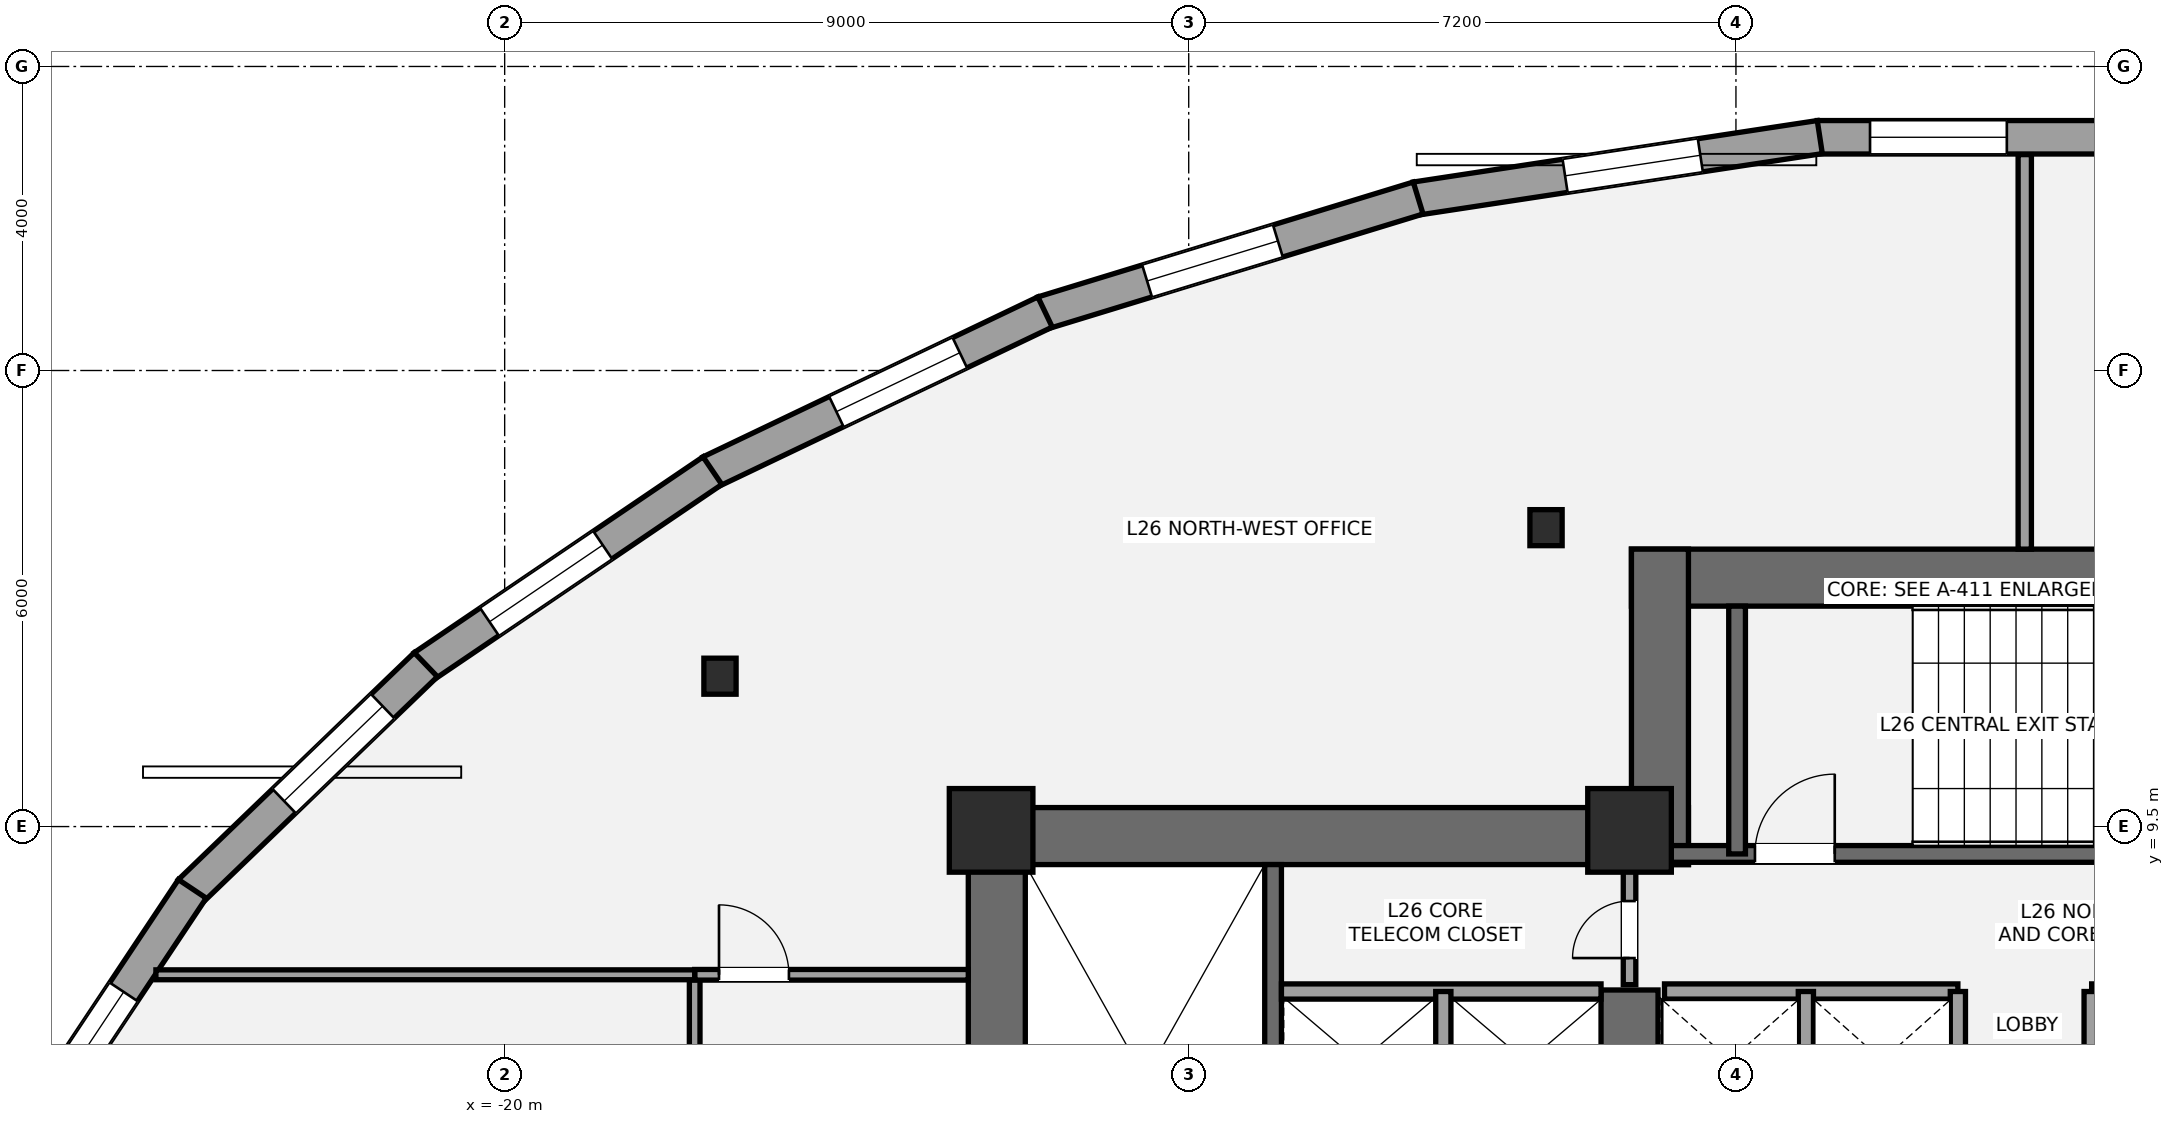
"""IFC4 building model, lengths in metres.
Left out: names, types, materials, properties, quantities, classifications, styles, units other than length and angle.
Written with IfcOpenShell. Run it as: python <this file> out.ifc"""

import sys

from ifc_helpers import new_model, si_unit, direction, frame, frame_2d, origin, origin_2d, place, context, subcontext, project, spatial, rectangle, i_section, extrude, element, fill, save


model = new_model("IFC4")
c1 = context("Model", 3, precision=1e-05, world=origin(), true_north=direction((0.0, 1.0)))
c2 = subcontext(c1, "Body", "Model", "MODEL_VIEW")
j1 = project(units=[si_unit("LENGTHUNIT", "METRE"), si_unit("PLANEANGLEUNIT", "RADIAN")], contexts=[c1])
p1 = place(None, origin())
s1 = spatial("IfcSite", under=j1, at=p1, CompositionType="ELEMENT")
p2 = place(p1, origin())
s2 = spatial("IfcBuilding", under=s1, at=p2, CompositionType="ELEMENT")
p3 = place(p2, frame((0.0, 0.0, 100.1)))
s3 = spatial("IfcBuildingStorey", under=s2, at=p3, CompositionType="ELEMENT", Elevation=100.1)
p4 = place(p3, frame((-13.525, 1.1, 0.0), z_axis=(0.0, 0.0, 1.0), x_axis=(0.0, 1.0, 0.0)))
e1 = element("IfcWall", 1, at=p4, inside=s3, PredefinedType="SHEAR", context=c2, shape_type="SweptSolid", body=[
    extrude(rectangle(XDim=8.65, YDim=0.75, at=frame_2d((4.325, 0.0))), origin(), (0.0, 0.0, 1.0), 3.5),
])
p5 = place(p3, frame((-13.9, 9.375, 0.0), z_axis=(0.0, 0.0, 1.0), x_axis=(1.0, 0.0, 0.0)))
e2 = element("IfcWall", 2, at=p5, inside=s3, PredefinedType="SHEAR", context=c2, shape_type="SweptSolid", body=[
    extrude(rectangle(XDim=9.475, YDim=0.75, at=frame_2d((4.737, 0.0))), origin(), (0.0, 0.0, 1.0), 3.5),
])
p6 = place(p3, frame((-5.2, 5.35, 0.0), z_axis=(0.0, 0.0, 1.0), x_axis=(0.0, 1.0, 0.0)))
e3 = element("IfcWall", 3, at=p6, inside=s3, PredefinedType="SHEAR", context=c2, shape_type="SweptSolid", body=[
    extrude(rectangle(XDim=2.0, YDim=0.75, at=frame_2d((1.0, 0.0))), origin(), (0.0, 0.0, 1.0), 3.5),
])
p7 = place(p3, frame((-9.89, 1.85, 0.0), z_axis=(0.0, 0.0, 1.0), x_axis=(0.0, 1.0, 0.0)))
e4 = element("IfcWall", 4, at=p7, inside=s3, PredefinedType="SHEAR", context=c2, shape_type="SweptSolid", body=[
    extrude(rectangle(XDim=7.15, YDim=0.22, at=frame_2d((3.575, 0.0))), origin(), (0.0, 0.0, 1.0), 3.5),
])
p8 = place(p3, frame((-5.175, 12.775, 0.0), z_axis=(0.0, 0.0, 1.0), x_axis=(1.0, 0.0, 0.0)))
e5 = element("IfcWall", 5, at=p8, inside=s3, PredefinedType="SHEAR", context=c2, shape_type="SweptSolid", body=[
    extrude(rectangle(XDim=10.35, YDim=0.75, at=frame_2d((5.175, 0.0))), origin(), (0.0, 0.0, 1.0), 3.5),
])
p9 = place(p3, frame((-4.8, 9.0, 0.0), z_axis=(0.0, 0.0, 1.0), x_axis=(0.0, 1.0, 0.0)))
e6 = element("IfcWall", 6, at=p9, inside=s3, PredefinedType="SHEAR", context=c2, shape_type="SweptSolid", body=[
    extrude(rectangle(XDim=4.15, YDim=0.75, at=frame_2d((2.075, 0.0))), origin(), (0.0, 0.0, 1.0), 3.5),
])
p10 = place(p3, frame((-4.7, 9.14, 0.0), z_axis=(0.0, 0.0, 1.0), x_axis=(1.0, 0.0, 0.0)))
e7 = element("IfcWall", 7, at=p10, inside=s3, PredefinedType="SHEAR", context=c2, shape_type="SweptSolid", body=[
    extrude(rectangle(XDim=9.3, YDim=0.22, at=frame_2d((4.65, 0.0))), origin(), (0.0, 0.0, 1.0), 3.5),
])
p11 = place(p10, frame((1.15, 0.0, 0.0)))
e8 = element("IfcOpeningElement", 8, at=p11, cuts=e7, PredefinedType="OPENING", context=c2, shape_type="SweptSolid", body=[
    extrude(rectangle(XDim=1.05, YDim=2.15, at=frame_2d((0.525, 1.075))), frame((0.0, 0.12, 0.0), z_axis=(0.0, -1.0, 0.0), x_axis=(1.0, 0.0, 0.0)), (0.0, 0.0, 1.0), 0.24),
])
p12 = place(p3, frame((-3.785, 9.14, 0.0), z_axis=(0.0, 0.0, 1.0), x_axis=(0.0, 1.0, 0.0)))
e9 = element("IfcWall", 9, at=p12, inside=s3, PredefinedType="SHEAR", context=c2, shape_type="SweptSolid", body=[
    extrude(rectangle(XDim=3.26, YDim=0.22, at=frame_2d((1.63, 0.0))), origin(), (0.0, 0.0, 1.0), 3.5),
])
for number, where, z_axis, x_axis in (
    (10, (-13.6, 9.45, 0.0), (0.0, 0.0, 1.0), (1.0, 0.0, 0.0)),
    (11, (-5.2, 9.45, 0.0), (0.0, 0.0, 1.0), (1.0, 0.0, 0.0)),
):
    element("IfcColumn", number, at=place(p3, frame(where, z_axis=z_axis, x_axis=x_axis)), inside=s3, PredefinedType="COLUMN", context=c2, shape_type="SweptSolid", body=[
        extrude(rectangle(XDim=1.1, YDim=1.1, at=origin_2d()), origin(), (0.0, 0.0, 1.0), 3.5),
    ])
for number, where, z_axis, x_axis in (
    (12, (-6.299, 13.433, 0.0), (0.0, 0.0, 1.0), (1.0, 0.0, 0.0)),
    (13, (-17.167, 11.478, 0.0), (0.0, 0.0, 1.0), (1.0, 0.0, 0.0)),
):
    element("IfcColumn", number, at=place(p3, frame(where, z_axis=z_axis, x_axis=x_axis)), inside=s3, PredefinedType="COLUMN", context=c2, shape_type="SweptSolid", body=[
        extrude(i_section(OverallWidth=0.424, OverallDepth=0.474, WebThickness=0.048, FlangeThickness=0.077, at=origin_2d()), origin(), (0.0, 0.0, 1.0), 3.5),
    ])
p13 = place(p3, frame((-2.73, 18.568, 0.0), z_axis=(0.0, 0.0, 1.0), x_axis=(1.0, 0.0, 0.0)))
e14 = element("IfcWall", 14, at=p13, inside=s3, PredefinedType="STANDARD", context=c2, shape_type="SweptSolid", body=[
    extrude(rectangle(XDim=5.459, YDim=0.44, at=frame_2d((2.73, 0.0))), origin(), (0.0, 0.0, 1.0), 2.528),
])
p14 = place(p13, frame((0.694, 0.0, 0.65)))
e15 = element("IfcOpeningElement", 15, at=p14, cuts=e14, PredefinedType="OPENING", context=c2, shape_type="SweptSolid", body=[
    extrude(rectangle(XDim=1.8, YDim=1.7, at=frame_2d((0.9, 0.85))), frame((0.0, 0.23, 0.0), z_axis=(0.0, -1.0, 0.0), x_axis=(1.0, 0.0, 0.0)), (0.0, 0.0, 1.0), 0.46),
])
p15 = place(p3, frame((-8.012, 17.762, 0.0), z_axis=(0.0, 0.0, 1.0), x_axis=(0.988627497469, 0.150385076545, 0.0)))
e16 = element("IfcWall", 16, at=p15, inside=s3, PredefinedType="STANDARD", context=c2, shape_type="SweptSolid", body=[
    extrude(rectangle(XDim=5.377, YDim=0.44, at=frame_2d((2.688, 0.0))), origin(), (0.0, 0.0, 1.0), 2.528),
])
p16 = place(p15, frame((1.987, 0.0, 0.65)))
e17 = element("IfcOpeningElement", 17, at=p16, cuts=e16, PredefinedType="OPENING", context=c2, shape_type="SweptSolid", body=[
    extrude(rectangle(XDim=1.8, YDim=1.7, at=frame_2d((0.9, 0.85))), frame((0.0, 0.23, 0.0), z_axis=(0.0, -1.0, 0.0), x_axis=(1.0, 0.0, 0.0)), (0.0, 0.0, 1.0), 0.46),
])
p17 = place(p3, frame((-12.92, 16.258, 0.0), z_axis=(0.0, 0.0, 1.0), x_axis=(0.956228569431, 0.292620783617, 0.0)))
e18 = element("IfcWall", 18, at=p17, inside=s3, PredefinedType="STANDARD", context=c2, shape_type="SweptSolid", body=[
    extrude(rectangle(XDim=5.165, YDim=0.44, at=frame_2d((2.583, 0.0))), origin(), (0.0, 0.0, 1.0), 2.528),
])
p18 = place(p17, frame((1.436, 0.0, 0.65)))
e19 = element("IfcOpeningElement", 19, at=p18, cuts=e18, PredefinedType="OPENING", context=c2, shape_type="SweptSolid", body=[
    extrude(rectangle(XDim=1.8, YDim=1.7, at=frame_2d((0.9, 0.85))), frame((0.0, 0.23, 0.0), z_axis=(0.0, -1.0, 0.0), x_axis=(1.0, 0.0, 0.0)), (0.0, 0.0, 1.0), 0.46),
])
p19 = place(p3, frame((-17.295, 14.166, 0.0), z_axis=(0.0, 0.0, 1.0), x_axis=(0.902372757907, 0.430956385018, 0.0)))
e20 = element("IfcWall", 20, at=p19, inside=s3, PredefinedType="STANDARD", context=c2, shape_type="SweptSolid", body=[
    extrude(rectangle(XDim=4.882, YDim=0.44, at=frame_2d((2.441, 0.0))), origin(), (0.0, 0.0, 1.0), 2.528),
])
p20 = place(p19, frame((1.839, 0.0, 0.65)))
e21 = element("IfcOpeningElement", 21, at=p20, cuts=e20, PredefinedType="OPENING", context=c2, shape_type="SweptSolid", body=[
    extrude(rectangle(XDim=1.8, YDim=1.7, at=frame_2d((0.9, 0.85))), frame((0.0, 0.23, 0.0), z_axis=(0.0, -1.0, 0.0), x_axis=(1.0, 0.0, 0.0)), (0.0, 0.0, 1.0), 0.46),
])
p21 = place(p3, frame((-21.066, 11.606, 0.0), z_axis=(0.0, 0.0, 1.0), x_axis=(0.827754551165, 0.56109036975, 0.0)))
e22 = element("IfcWall", 22, at=p21, inside=s3, PredefinedType="STANDARD", context=c2, shape_type="SweptSolid", body=[
    extrude(rectangle(XDim=4.591, YDim=0.44, at=frame_2d((2.295, 0.0))), origin(), (0.0, 0.0, 1.0), 2.528),
])
p22 = place(p21, frame((1.047, 0.0, 0.65)))
e23 = element("IfcOpeningElement", 23, at=p22, cuts=e22, PredefinedType="OPENING", context=c2, shape_type="SweptSolid", body=[
    extrude(rectangle(XDim=1.8, YDim=1.7, at=frame_2d((0.9, 0.85))), frame((0.0, 0.23, 0.0), z_axis=(0.0, -1.0, 0.0), x_axis=(1.0, 0.0, 0.0)), (0.0, 0.0, 1.0), 0.46),
])
p23 = place(p3, frame((-24.14, 8.644, 0.0), z_axis=(0.0, 0.0, 1.0), x_axis=(0.720581378362, 0.693370375166, 0.0)))
e24 = element("IfcWall", 24, at=p23, inside=s3, PredefinedType="STANDARD", context=c2, shape_type="SweptSolid", body=[
    extrude(rectangle(XDim=4.307, YDim=0.44, at=frame_2d((2.153, 0.0))), origin(), (0.0, 0.0, 1.0), 2.528),
])
p24 = place(p23, frame((1.719, 0.0, 0.65)))
e25 = element("IfcOpeningElement", 25, at=p24, cuts=e24, PredefinedType="OPENING", context=c2, shape_type="SweptSolid", body=[
    extrude(rectangle(XDim=1.8, YDim=1.7, at=frame_2d((0.9, 0.85))), frame((0.0, 0.23, 0.0), z_axis=(0.0, -1.0, 0.0), x_axis=(1.0, 0.0, 0.0)), (0.0, 0.0, 1.0), 0.46),
])
p25 = place(p3, frame((-26.34, 5.332, 0.0), z_axis=(0.0, 0.0, 1.0), x_axis=(0.554293965046, 0.83232097193, 0.0)))
e26 = element("IfcWall", 26, at=p25, inside=s3, PredefinedType="STANDARD", context=c2, shape_type="SweptSolid", body=[
    extrude(rectangle(XDim=4.023, YDim=0.44, at=frame_2d((2.011, 0.0))), origin(), (0.0, 0.0, 1.0), 2.528),
])
p26 = place(p25, frame((0.594, 0.0, 0.65)))
e27 = element("IfcOpeningElement", 27, at=p26, cuts=e26, PredefinedType="OPENING", context=c2, shape_type="SweptSolid", body=[
    extrude(rectangle(XDim=1.8, YDim=1.7, at=frame_2d((0.9, 0.85))), frame((0.0, 0.23, 0.0), z_axis=(0.0, -1.0, 0.0), x_axis=(1.0, 0.0, 0.0)), (0.0, 0.0, 1.0), 0.46),
])
p27 = place(p3, frame((-9.78, 7.33, 0.0), z_axis=(0.0, 0.0, 1.0), x_axis=(1.0, 0.0, 0.0)))
e28 = element("IfcWall", 28, at=p27, inside=s3, PredefinedType="SOLIDWALL", context=c2, shape_type="SweptSolid", body=[
    extrude(rectangle(XDim=4.205, YDim=0.2, at=frame_2d((2.103, 0.0))), origin(), (0.0, 0.0, 1.0), 3.31),
])
p28 = place(p3, frame((-7.65, 5.47, 0.0), z_axis=(0.0, 0.0, 1.0), x_axis=(0.0, 1.0, 0.0)))
e29 = element("IfcWall", 29, at=p28, inside=s3, PredefinedType="SOLIDWALL", context=c2, shape_type="SweptSolid", body=[
    extrude(rectangle(XDim=1.86, YDim=0.2, at=frame_2d((0.93, 0.0))), origin(), (0.0, 0.0, 1.0), 3.31),
])
for number, where, z_axis, x_axis in (
    (30, (-4.74, 7.33, 0.0), (0.0, 0.0, 1.0), (1.0, 0.0, 0.0)),
    (31, (0.88, 7.33, 0.0), (0.0, 0.0, 1.0), (1.0, 0.0, 0.0)),
):
    element("IfcWall", number, at=place(p3, frame(where, z_axis=z_axis, x_axis=x_axis)), inside=s3, PredefinedType="SOLIDWALL", context=c2, shape_type="SweptSolid", body=[
        extrude(rectangle(XDim=3.86, YDim=0.2, at=frame_2d((1.93, 0.0))), origin(), (0.0, 0.0, 1.0), 3.31),
    ])
for number, where, z_axis, x_axis in (
    (32, (-2.88, 5.52, 0.0), (0.0, 0.0, 1.0), (0.0, 1.0, 0.0)),
    (33, (-0.88, 5.52, 0.0), (0.0, 0.0, 1.0), (0.0, 1.0, 0.0)),
    (34, (0.88, 5.52, 0.0), (0.0, 0.0, 1.0), (0.0, 1.0, 0.0)),
):
    element("IfcWall", number, at=place(p3, frame(where, z_axis=z_axis, x_axis=x_axis)), inside=s3, PredefinedType="SOLIDWALL", context=c2, shape_type="SweptSolid", body=[
        extrude(rectangle(XDim=1.81, YDim=0.2, at=frame_2d((0.905, 0.0))), origin(), (0.0, 0.0, 1.0), 3.31),
    ])
p29 = place(p3, frame((-5.2, 7.42, 0.0), z_axis=(0.0, 0.0, 1.0), x_axis=(0.0, 1.0, 0.0)))
e35 = element("IfcWall", 35, at=p29, inside=s3, PredefinedType="PARTITIONING", context=c2, shape_type="SweptSolid", body=[
    extrude(rectangle(XDim=1.58, YDim=0.165, at=frame_2d((0.79, 0.0))), origin(), (0.0, 0.0, 1.0), 3.31),
])
p30 = place(p29, frame((0.35, 0.0, 0.0)))
e36 = element("IfcOpeningElement", 36, at=p30, cuts=e35, PredefinedType="OPENING", context=c2, shape_type="SweptSolid", body=[
    extrude(rectangle(XDim=0.75, YDim=2.1, at=frame_2d((0.375, 1.05))), frame((0.0, 0.093, 0.0), z_axis=(0.0, -1.0, 0.0), x_axis=(1.0, 0.0, 0.0)), (0.0, 0.0, 1.0), 0.185),
])
p31 = place(p3, frame((-17.5, -13.748, 0.0), z_axis=(0.0, 0.0, 1.0), x_axis=(0.0, 1.0, 0.0)))
e37 = element("IfcWall", 37, at=p31, inside=s3, PredefinedType="PARTITIONING", context=c2, shape_type="SweptSolid", body=[
    extrude(rectangle(XDim=21.298, YDim=0.14, at=frame_2d((10.649, 0.0))), origin(), (0.0, 0.0, 1.0), 2.688),
])
p32 = place(p31, frame((10.499, 0.0, 0.0)))
e38 = element("IfcOpeningElement", 38, at=p32, cuts=e37, PredefinedType="OPENING", context=c2, shape_type="SweptSolid", body=[
    extrude(rectangle(XDim=0.9, YDim=2.1, at=frame_2d((0.45, 1.05))), frame((0.0, 0.08, 0.0), z_axis=(0.0, -1.0, 0.0), x_axis=(1.0, 0.0, 0.0)), (0.0, 0.0, 1.0), 0.16),
])
p33 = place(p31, frame((17.974, 0.0, 0.0)))
e39 = element("IfcOpeningElement", 39, at=p33, cuts=e37, PredefinedType="OPENING", context=c2, shape_type="SweptSolid", body=[
    extrude(rectangle(XDim=0.9, YDim=2.1, at=frame_2d((0.45, 1.05))), frame((0.0, 0.08, 0.0), z_axis=(0.0, -1.0, 0.0), x_axis=(1.0, 0.0, 0.0)), (0.0, 0.0, 1.0), 0.16),
])
p34 = place(p3, frame((-17.5, 7.55, 0.0), z_axis=(0.0, 0.0, 1.0), x_axis=(1.0, 0.0, 0.0)))
e40 = element("IfcWall", 40, at=p34, inside=s3, PredefinedType="PARTITIONING", context=c2, shape_type="SweptSolid", body=[
    extrude(rectangle(XDim=3.6, YDim=0.14, at=frame_2d((1.8, 0.0))), origin(), (0.0, 0.0, 1.0), 3.31),
])
p35 = place(p34, frame((0.32, 0.0, 0.0)))
e41 = element("IfcOpeningElement", 41, at=p35, cuts=e40, PredefinedType="OPENING", context=c2, shape_type="SweptSolid", body=[
    extrude(rectangle(XDim=0.92, YDim=2.15, at=frame_2d((0.46, 1.075))), frame((0.0, 0.08, 0.0), z_axis=(0.0, -1.0, 0.0), x_axis=(1.0, 0.0, 0.0)), (0.0, 0.0, 1.0), 0.16),
])
p36 = place(p3, frame((0.0, 13.15, 0.0), z_axis=(0.0, 0.0, 1.0), x_axis=(0.0, 1.0, 0.0)))
e42 = element("IfcWall", 42, at=p36, inside=s3, PredefinedType="PARTITIONING", context=c2, shape_type="SweptSolid", body=[
    extrude(rectangle(XDim=5.19, YDim=0.175, at=frame_2d((2.595, 0.0))), origin(), (0.0, 0.0, 1.0), 3.31),
])
p37 = place(p3, frame((-24.589, 7.55, 0.0), z_axis=(0.0, 0.0, 1.0), x_axis=(1.0, 0.0, 0.0)))
e43 = element("IfcWall", 43, at=p37, inside=s3, PredefinedType="PARTITIONING", context=c2, shape_type="SweptSolid", body=[
    extrude(rectangle(XDim=7.089, YDim=0.13, at=frame_2d((3.544, 0.0))), origin(), (0.0, 0.0, 1.0), 2.763),
])
p38 = place(p14, origin())
e44 = element("IfcWindow", 44, at=p38, inside=s3, PartitioningType="SINGLE_PANEL", PredefinedType="WINDOW", context=c2, shape_type="SweptSolid", body=[
    extrude(rectangle(XDim=1.8, YDim=1.7, at=frame_2d((0.9, 0.85))), frame((0.0, -0.01, 0.0), z_axis=(0.0, -1.0, 0.0), x_axis=(1.0, 0.0, 0.0)), (0.0, 0.0, 1.0), 0.06),
])
fill(e15, e44)
p39 = place(p16, origin())
e45 = element("IfcWindow", 45, at=p39, inside=s3, PartitioningType="SINGLE_PANEL", PredefinedType="WINDOW", context=c2, shape_type="SweptSolid", body=[
    extrude(rectangle(XDim=1.8, YDim=1.7, at=frame_2d((0.9, 0.85))), frame((0.0, -0.01, 0.0), z_axis=(0.0, -1.0, 0.0), x_axis=(1.0, 0.0, 0.0)), (0.0, 0.0, 1.0), 0.06),
])
fill(e17, e45)
p40 = place(p18, origin())
e46 = element("IfcWindow", 46, at=p40, inside=s3, PartitioningType="SINGLE_PANEL", PredefinedType="WINDOW", context=c2, shape_type="SweptSolid", body=[
    extrude(rectangle(XDim=1.8, YDim=1.7, at=frame_2d((0.9, 0.85))), frame((0.0, -0.01, 0.0), z_axis=(0.0, -1.0, 0.0), x_axis=(1.0, 0.0, 0.0)), (0.0, 0.0, 1.0), 0.06),
])
fill(e19, e46)
p41 = place(p20, origin())
e47 = element("IfcWindow", 47, at=p41, inside=s3, PartitioningType="SINGLE_PANEL", PredefinedType="WINDOW", context=c2, shape_type="SweptSolid", body=[
    extrude(rectangle(XDim=1.8, YDim=1.7, at=frame_2d((0.9, 0.85))), frame((0.0, -0.01, 0.0), z_axis=(0.0, -1.0, 0.0), x_axis=(1.0, 0.0, 0.0)), (0.0, 0.0, 1.0), 0.06),
])
fill(e21, e47)
p42 = place(p22, origin())
e48 = element("IfcWindow", 48, at=p42, inside=s3, PartitioningType="SINGLE_PANEL", PredefinedType="WINDOW", context=c2, shape_type="SweptSolid", body=[
    extrude(rectangle(XDim=1.8, YDim=1.7, at=frame_2d((0.9, 0.85))), frame((0.0, -0.01, 0.0), z_axis=(0.0, -1.0, 0.0), x_axis=(1.0, 0.0, 0.0)), (0.0, 0.0, 1.0), 0.06),
])
fill(e23, e48)
p43 = place(p24, origin())
e49 = element("IfcWindow", 49, at=p43, inside=s3, PartitioningType="SINGLE_PANEL", PredefinedType="WINDOW", context=c2, shape_type="SweptSolid", body=[
    extrude(rectangle(XDim=1.8, YDim=1.7, at=frame_2d((0.9, 0.85))), frame((0.0, -0.01, 0.0), z_axis=(0.0, -1.0, 0.0), x_axis=(1.0, 0.0, 0.0)), (0.0, 0.0, 1.0), 0.06),
])
fill(e25, e49)
p44 = place(p26, origin())
e50 = element("IfcWindow", 50, at=p44, inside=s3, PartitioningType="SINGLE_PANEL", PredefinedType="WINDOW", context=c2, shape_type="SweptSolid", body=[
    extrude(rectangle(XDim=1.8, YDim=1.7, at=frame_2d((0.9, 0.85))), frame((0.0, -0.01, 0.0), z_axis=(0.0, -1.0, 0.0), x_axis=(1.0, 0.0, 0.0)), (0.0, 0.0, 1.0), 0.06),
])
fill(e27, e50)
p45 = place(p11, origin())
e51 = element("IfcDoor", 51, at=p45, inside=s3, OperationType="SINGLE_SWING_RIGHT", PredefinedType="DOOR", context=c2, shape_type="SweptSolid", body=[
    extrude(rectangle(XDim=1.05, YDim=2.15, at=frame_2d((0.525, 1.075))), frame((0.0, 0.025, 0.0), z_axis=(0.0, -1.0, 0.0), x_axis=(1.0, 0.0, 0.0)), (0.0, 0.0, 1.0), 0.05),
])
fill(e8, e51)
p46 = place(p30, origin())
e52 = element("IfcDoor", 52, at=p46, inside=s3, OperationType="SINGLE_SWING_LEFT", PredefinedType="DOOR", context=c2, shape_type="SweptSolid", body=[
    extrude(rectangle(XDim=0.75, YDim=2.1, at=frame_2d((0.375, 1.05))), frame((0.0, 0.025, 0.0), z_axis=(0.0, -1.0, 0.0), x_axis=(1.0, 0.0, 0.0)), (0.0, 0.0, 1.0), 0.05),
])
fill(e36, e52)
p47 = place(p35, origin())
e53 = element("IfcDoor", 53, at=p47, inside=s3, OperationType="SINGLE_SWING_LEFT", PredefinedType="DOOR", context=c2, shape_type="SweptSolid", body=[
    extrude(rectangle(XDim=0.92, YDim=2.15, at=frame_2d((0.46, 1.075))), frame((0.0, 0.025, 0.0), z_axis=(0.0, -1.0, 0.0), x_axis=(1.0, 0.0, 0.0)), (0.0, 0.0, 1.0), 0.05),
])
fill(e41, e53)
save(model, sys.argv[1])
